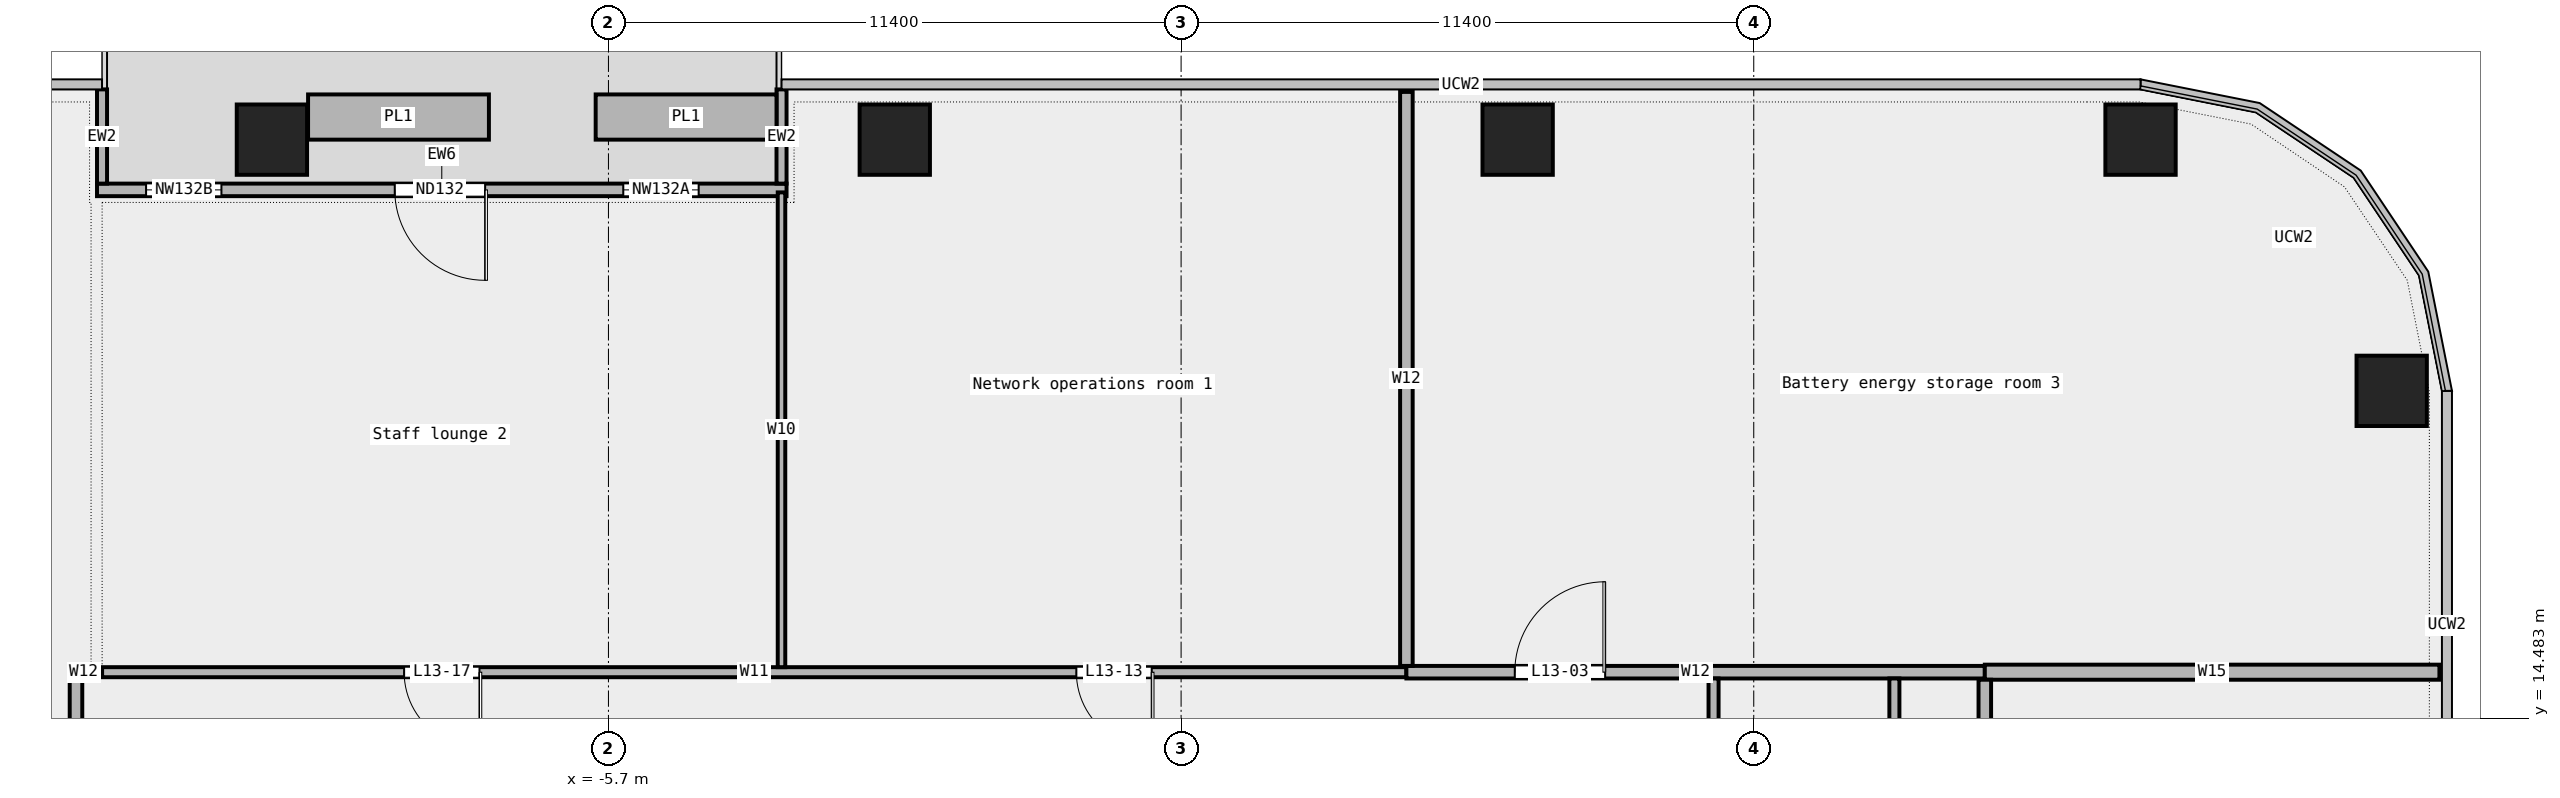
"""IFC4 building model, lengths in metres.
Left out: names, types, materials, properties, quantities, classifications, styles, units other than length and angle.
Written with IfcOpenShell. Run it as: python <this file> out.ifc"""

import sys

from ifc_helpers import new_model, si_unit, direction, frame, frame_2d, origin, origin_2d, place, context, subcontext, project, spatial, rectangle, extrude, element, fill, save


model = new_model("IFC4")
c1 = context("Model", 3, precision=1e-05, world=origin(), true_north=direction((0.0, 1.0)))
c2 = subcontext(c1, "Body", "Model", "MODEL_VIEW")
j1 = project(units=[si_unit("LENGTHUNIT", "METRE"), si_unit("PLANEANGLEUNIT", "RADIAN")], contexts=[c1])
p1 = place(None, origin())
s1 = spatial("IfcSite", under=j1, at=p1, CompositionType="ELEMENT")
p2 = place(p1, origin())
s2 = spatial("IfcBuilding", under=s1, at=p2, CompositionType="ELEMENT")
p3 = place(p2, frame((0.0, 0.0, 69.4)))
s3 = spatial("IfcBuildingStorey", under=s2, at=p3, CompositionType="ELEMENT", Elevation=69.4)
for number, where, z_axis, x_axis in (
    (1, (29.8, 21.0, 0.0), (0.0, 0.0, 1.0), (1.0, 0.0, 0.0)),
    (2, (24.8, 26.0, 0.0), (0.0, 0.0, 1.0), (1.0, 0.0, 0.0)),
    (3, (12.4, 26.0, 0.0), (0.0, 0.0, 1.0), (1.0, 0.0, 0.0)),
    (4, (0.0, 26.0, 0.0), (0.0, 0.0, 1.0), (1.0, 0.0, 0.0)),
    (5, (-12.4, 26.0, 0.0), (0.0, 0.0, 1.0), (1.0, 0.0, 0.0)),
):
    element("IfcColumn", number, at=place(p3, frame(where, z_axis=z_axis, x_axis=x_axis)), inside=s3, PredefinedType="COLUMN", context=c2, shape_type="SweptSolid", body=[
        extrude(rectangle(XDim=1.4, YDim=1.4, at=origin_2d()), origin(), (0.0, 0.0, 1.0), 4.35),
    ])
p4 = place(p3, frame((-2.155, 25.0, 0.0), z_axis=(0.0, 0.0, 1.0), x_axis=(-1.0, 0.0, 0.0)))
e6 = element("IfcWall", 6, at=p4, inside=s3, PredefinedType="STANDARD", context=c2, shape_type="SweptSolid", body=[
    extrude(rectangle(XDim=13.727, YDim=0.25, at=frame_2d((6.864, 0.0))), origin(), (0.0, 0.0, 1.0), 4.35),
])
p5 = place(p4, frame((1.75, 0.0, 0.45)))
e7 = element("IfcOpeningElement", 7, at=p5, cuts=e6, PredefinedType="OPENING", context=c2, shape_type="SweptSolid", body=[
    extrude(rectangle(XDim=1.5, YDim=3.0, at=frame_2d((0.75, 1.5))), frame((0.0, 0.137, 0.0), z_axis=(0.0, -1.0, 0.0), x_axis=(1.0, 0.0, 0.0)), (0.0, 0.0, 1.0), 0.274),
])
p6 = place(p4, frame((6.0, 0.0, 0.0)))
e8 = element("IfcOpeningElement", 8, at=p6, cuts=e6, PredefinedType="OPENING", context=c2, shape_type="SweptSolid", body=[
    extrude(rectangle(XDim=1.8, YDim=2.4, at=frame_2d((0.9, 1.2))), frame((0.0, 0.137, 0.0), z_axis=(0.0, -1.0, 0.0), x_axis=(1.0, 0.0, 0.0)), (0.0, 0.0, 1.0), 0.274),
])
p7 = place(p4, frame((11.25, 0.0, 0.45)))
e9 = element("IfcOpeningElement", 9, at=p7, cuts=e6, PredefinedType="OPENING", context=c2, shape_type="SweptSolid", body=[
    extrude(rectangle(XDim=1.5, YDim=3.0, at=frame_2d((0.75, 1.5))), frame((0.0, 0.137, 0.0), z_axis=(0.0, -1.0, 0.0), x_axis=(1.0, 0.0, 0.0)), (0.0, 0.0, 1.0), 0.274),
])
for number, where, z_axis, x_axis in (
    (10, (-2.255, 27.0, 0.0), (0.0, 0.0, 1.0), (0.0, -1.0, 0.0)),
    (11, (-15.782, 27.0, 0.0), (0.0, 0.0, 1.0), (0.0, -1.0, 0.0)),
):
    element("IfcWall", number, at=place(p3, frame(where, z_axis=z_axis, x_axis=x_axis)), inside=s3, PredefinedType="STANDARD", context=c2, shape_type="SweptSolid", body=[
        extrude(rectangle(XDim=1.875, YDim=0.2, at=frame_2d((0.938, 0.0))), origin(), (0.0, 0.0, 1.0), 4.35),
    ])
for number, where, z_axis, x_axis in (
    (12, (-2.354, 26.45, 0.0), (0.0, 0.0, 1.0), (-1.0, 0.0, 0.0)),
    (13, (-8.08, 26.45, 0.0), (0.0, 0.0, 1.0), (-1.0, 0.0, 0.0)),
):
    element("IfcWall", number, at=place(p3, frame(where, z_axis=z_axis, x_axis=x_axis)), inside=s3, PredefinedType="STANDARD", context=c2, shape_type="SweptSolid", body=[
        extrude(rectangle(XDim=3.6, YDim=0.9, at=frame_2d((1.8, 0.0))), origin(), (0.0, 0.0, 1.0), 0.7),
    ])
p8 = place(p3, frame((-15.78, 15.4, 0.0), z_axis=(0.0, 0.0, 1.0), x_axis=(1.0, 0.0, 0.0)))
e14 = element("IfcWall", 14, at=p8, inside=s3, PredefinedType="PARTITIONING", context=c2, shape_type="SweptSolid", body=[
    extrude(rectangle(XDim=25.965, YDim=0.2, at=frame_2d((12.982, 0.0))), origin(), (0.0, 0.0, 1.0), 4.35),
])
p9 = place(p8, frame((19.395, 0.0, 0.0)))
e15 = element("IfcOpeningElement", 15, at=p9, cuts=e14, PredefinedType="OPENING", context=c2, shape_type="SweptSolid", body=[
    extrude(rectangle(XDim=1.5, YDim=2.1, at=frame_2d((0.75, 1.05))), frame((0.0, 0.112, 0.0), z_axis=(0.0, -1.0, 0.0), x_axis=(1.0, 0.0, 0.0)), (0.0, 0.0, 1.0), 0.224),
])
p10 = place(p8, frame((6.012, 0.0, 0.0)))
e16 = element("IfcOpeningElement", 16, at=p10, cuts=e14, PredefinedType="OPENING", context=c2, shape_type="SweptSolid", body=[
    extrude(rectangle(XDim=1.5, YDim=2.1, at=frame_2d((0.75, 1.05))), frame((0.0, 0.112, 0.0), z_axis=(0.0, -1.0, 0.0), x_axis=(1.0, 0.0, 0.0)), (0.0, 0.0, 1.0), 0.224),
])
p11 = place(p3, frame((-16.3, 15.4, 0.0), z_axis=(0.0, 0.0, 1.0), x_axis=(1.0, 0.0, 0.0)))
e17 = element("IfcWall", 17, at=p11, inside=s3, PredefinedType="PARTITIONING", context=c2, shape_type="SweptSolid", body=[
    extrude(rectangle(XDim=0.3, YDim=0.25, at=frame_2d((0.15, 0.0))), origin(), (0.0, 0.0, 1.0), 4.35),
])
p12 = place(p3, frame((10.185, 15.4, 0.0), z_axis=(0.0, 0.0, 1.0), x_axis=(1.0, 0.0, 0.0)))
e18 = element("IfcWall", 18, at=p12, inside=s3, PredefinedType="PARTITIONING", context=c2, shape_type="SweptSolid", body=[
    extrude(rectangle(XDim=11.515, YDim=0.25, at=frame_2d((5.757, 0.0))), origin(), (0.0, 0.0, 1.0), 4.35),
])
p13 = place(p12, frame((2.157, 0.0, 0.0)))
e19 = element("IfcOpeningElement", 19, at=p13, cuts=e18, PredefinedType="OPENING", context=c2, shape_type="SweptSolid", body=[
    extrude(rectangle(XDim=1.8, YDim=2.1, at=frame_2d((0.9, 1.05))), frame((0.0, 0.137, 0.0), z_axis=(0.0, -1.0, 0.0), x_axis=(1.0, 0.0, 0.0)), (0.0, 0.0, 1.0), 0.274),
])
p14 = place(p3, frame((21.7, 15.4, 0.0), z_axis=(0.0, 0.0, 1.0), x_axis=(1.0, 0.0, 0.0)))
e20 = element("IfcWall", 20, at=p14, inside=s3, PredefinedType="PARTITIONING", context=c2, shape_type="SweptSolid", body=[
    extrude(rectangle(XDim=9.05, YDim=0.3, at=frame_2d((4.525, 0.0))), origin(), (0.0, 0.0, 1.0), 4.35),
])
p15 = place(p3, frame((-16.3, 11.8, 0.0), z_axis=(0.0, 0.0, 1.0), x_axis=(0.0, 1.0, 0.0)))
e21 = element("IfcWall", 21, at=p15, inside=s3, PredefinedType="PARTITIONING", context=c2, shape_type="SweptSolid", body=[
    extrude(rectangle(XDim=3.475, YDim=0.25, at=frame_2d((1.737, 0.0))), origin(), (0.0, 0.0, 1.0), 4.35),
])
p16 = place(p3, frame((-2.255, 15.5, 0.0), z_axis=(0.0, 0.0, 1.0), x_axis=(0.0, 1.0, 0.0)))
e22 = element("IfcWall", 22, at=p16, inside=s3, PredefinedType="PARTITIONING", context=c2, shape_type="SweptSolid", body=[
    extrude(rectangle(XDim=9.45, YDim=0.15, at=frame_2d((4.725, 0.0))), origin(), (0.0, 0.0, 1.0), 4.35),
])
p17 = place(p3, frame((10.185, 15.525, 0.0), z_axis=(0.0, 0.0, 1.0), x_axis=(0.0, 1.0, 0.0)))
e23 = element("IfcWall", 23, at=p17, inside=s3, PredefinedType="PARTITIONING", context=c2, shape_type="SweptSolid", body=[
    extrude(rectangle(XDim=11.425, YDim=0.25, at=frame_2d((5.712, 0.0))), origin(), (0.0, 0.0, 1.0), 4.35),
])
p18 = place(p3, frame((16.3, 11.8, 0.0), z_axis=(0.0, 0.0, 1.0), x_axis=(0.0, 1.0, 0.0)))
e24 = element("IfcWall", 24, at=p18, inside=s3, PredefinedType="PARTITIONING", context=c2, shape_type="SweptSolid", body=[
    extrude(rectangle(XDim=3.475, YDim=0.2, at=frame_2d((1.737, 0.0))), origin(), (0.0, 0.0, 1.0), 4.35),
])
p19 = place(p3, frame((19.9, 8.18, 0.0), z_axis=(0.0, 0.0, 1.0), x_axis=(0.0, 1.0, 0.0)))
e25 = element("IfcWall", 25, at=p19, inside=s3, PredefinedType="PARTITIONING", context=c2, shape_type="SweptSolid", body=[
    extrude(rectangle(XDim=7.095, YDim=0.2, at=frame_2d((3.547, 0.0))), origin(), (0.0, 0.0, 1.0), 4.35),
])
p20 = place(p19, frame((3.097, 0.0, 0.0)))
e26 = element("IfcOpeningElement", 26, at=p20, cuts=e25, PredefinedType="OPENING", context=c2, shape_type="SweptSolid", body=[
    extrude(rectangle(XDim=0.9, YDim=2.1, at=frame_2d((0.45, 1.05))), frame((0.0, 0.112, 0.0), z_axis=(0.0, -1.0, 0.0), x_axis=(1.0, 0.0, 0.0)), (0.0, 0.0, 1.0), 0.224),
])
p21 = place(p3, frame((21.7, 11.79, 0.0), z_axis=(0.0, 0.0, 1.0), x_axis=(0.0, 1.0, 0.0)))
e27 = element("IfcWall", 27, at=p21, inside=s3, PredefinedType="PARTITIONING", context=c2, shape_type="SweptSolid", body=[
    extrude(rectangle(XDim=3.46, YDim=0.25, at=frame_2d((1.73, 0.0))), origin(), (0.0, 0.0, 1.0), 4.35),
])
p22 = place(p21, frame((1.28, 0.0, 0.0)))
e28 = element("IfcOpeningElement", 28, at=p22, cuts=e27, PredefinedType="OPENING", context=c2, shape_type="SweptSolid", body=[
    extrude(rectangle(XDim=0.9, YDim=2.1, at=frame_2d((0.45, 1.05))), frame((0.0, 0.137, 0.0), z_axis=(0.0, -1.0, 0.0), x_axis=(1.0, 0.0, 0.0)), (0.0, 0.0, 1.0), 0.274),
])
p23 = place(p5, origin())
e29 = element("IfcWindow", 29, at=p23, inside=s3, PartitioningType="SINGLE_PANEL", PredefinedType="WINDOW", context=c2, shape_type="SweptSolid", body=[
    extrude(rectangle(XDim=1.5, YDim=3.0, at=frame_2d((0.75, 1.5))), frame((0.0, 0.03, 0.0), z_axis=(0.0, -1.0, 0.0), x_axis=(1.0, 0.0, 0.0)), (0.0, 0.0, 1.0), 0.06),
])
fill(e7, e29)
p24 = place(p6, origin())
e30 = element("IfcDoor", 30, at=p24, inside=s3, OperationType="DOUBLE_DOOR_SINGLE_SWING", PredefinedType="DOOR", context=c2, shape_type="SweptSolid", body=[
    extrude(rectangle(XDim=1.8, YDim=2.4, at=frame_2d((0.9, 1.2))), frame((0.0, 0.025, 0.0), z_axis=(0.0, -1.0, 0.0), x_axis=(1.0, 0.0, 0.0)), (0.0, 0.0, 1.0), 0.05),
])
fill(e8, e30)
p25 = place(p7, origin())
e31 = element("IfcWindow", 31, at=p25, inside=s3, PartitioningType="SINGLE_PANEL", PredefinedType="WINDOW", context=c2, shape_type="SweptSolid", body=[
    extrude(rectangle(XDim=1.5, YDim=3.0, at=frame_2d((0.75, 1.5))), frame((0.0, 0.03, 0.0), z_axis=(0.0, -1.0, 0.0), x_axis=(1.0, 0.0, 0.0)), (0.0, 0.0, 1.0), 0.06),
])
fill(e9, e31)
p26 = place(p13, origin())
e32 = element("IfcDoor", 32, at=p26, inside=s3, OperationType="DOUBLE_DOOR_SINGLE_SWING", PredefinedType="DOOR", context=c2, shape_type="SweptSolid", body=[
    extrude(rectangle(XDim=1.8, YDim=2.1, at=frame_2d((0.9, 1.05))), frame((0.0, 0.025, 0.0), z_axis=(0.0, -1.0, 0.0), x_axis=(1.0, 0.0, 0.0)), (0.0, 0.0, 1.0), 0.05),
])
fill(e19, e32)
p27 = place(p9, origin())
e33 = element("IfcDoor", 33, at=p27, inside=s3, OperationType="DOUBLE_DOOR_SINGLE_SWING", PredefinedType="DOOR", context=c2, shape_type="SweptSolid", body=[
    extrude(rectangle(XDim=1.5, YDim=2.1, at=frame_2d((0.75, 1.05))), frame((0.0, 0.025, 0.0), z_axis=(0.0, -1.0, 0.0), x_axis=(1.0, 0.0, 0.0)), (0.0, 0.0, 1.0), 0.05),
])
fill(e15, e33)
p28 = place(p10, origin())
e34 = element("IfcDoor", 34, at=p28, inside=s3, OperationType="DOUBLE_DOOR_SINGLE_SWING", PredefinedType="DOOR", context=c2, shape_type="SweptSolid", body=[
    extrude(rectangle(XDim=1.5, YDim=2.1, at=frame_2d((0.75, 1.05))), frame((0.0, 0.025, 0.0), z_axis=(0.0, -1.0, 0.0), x_axis=(1.0, 0.0, 0.0)), (0.0, 0.0, 1.0), 0.05),
])
fill(e16, e34)
save(model, sys.argv[1])
